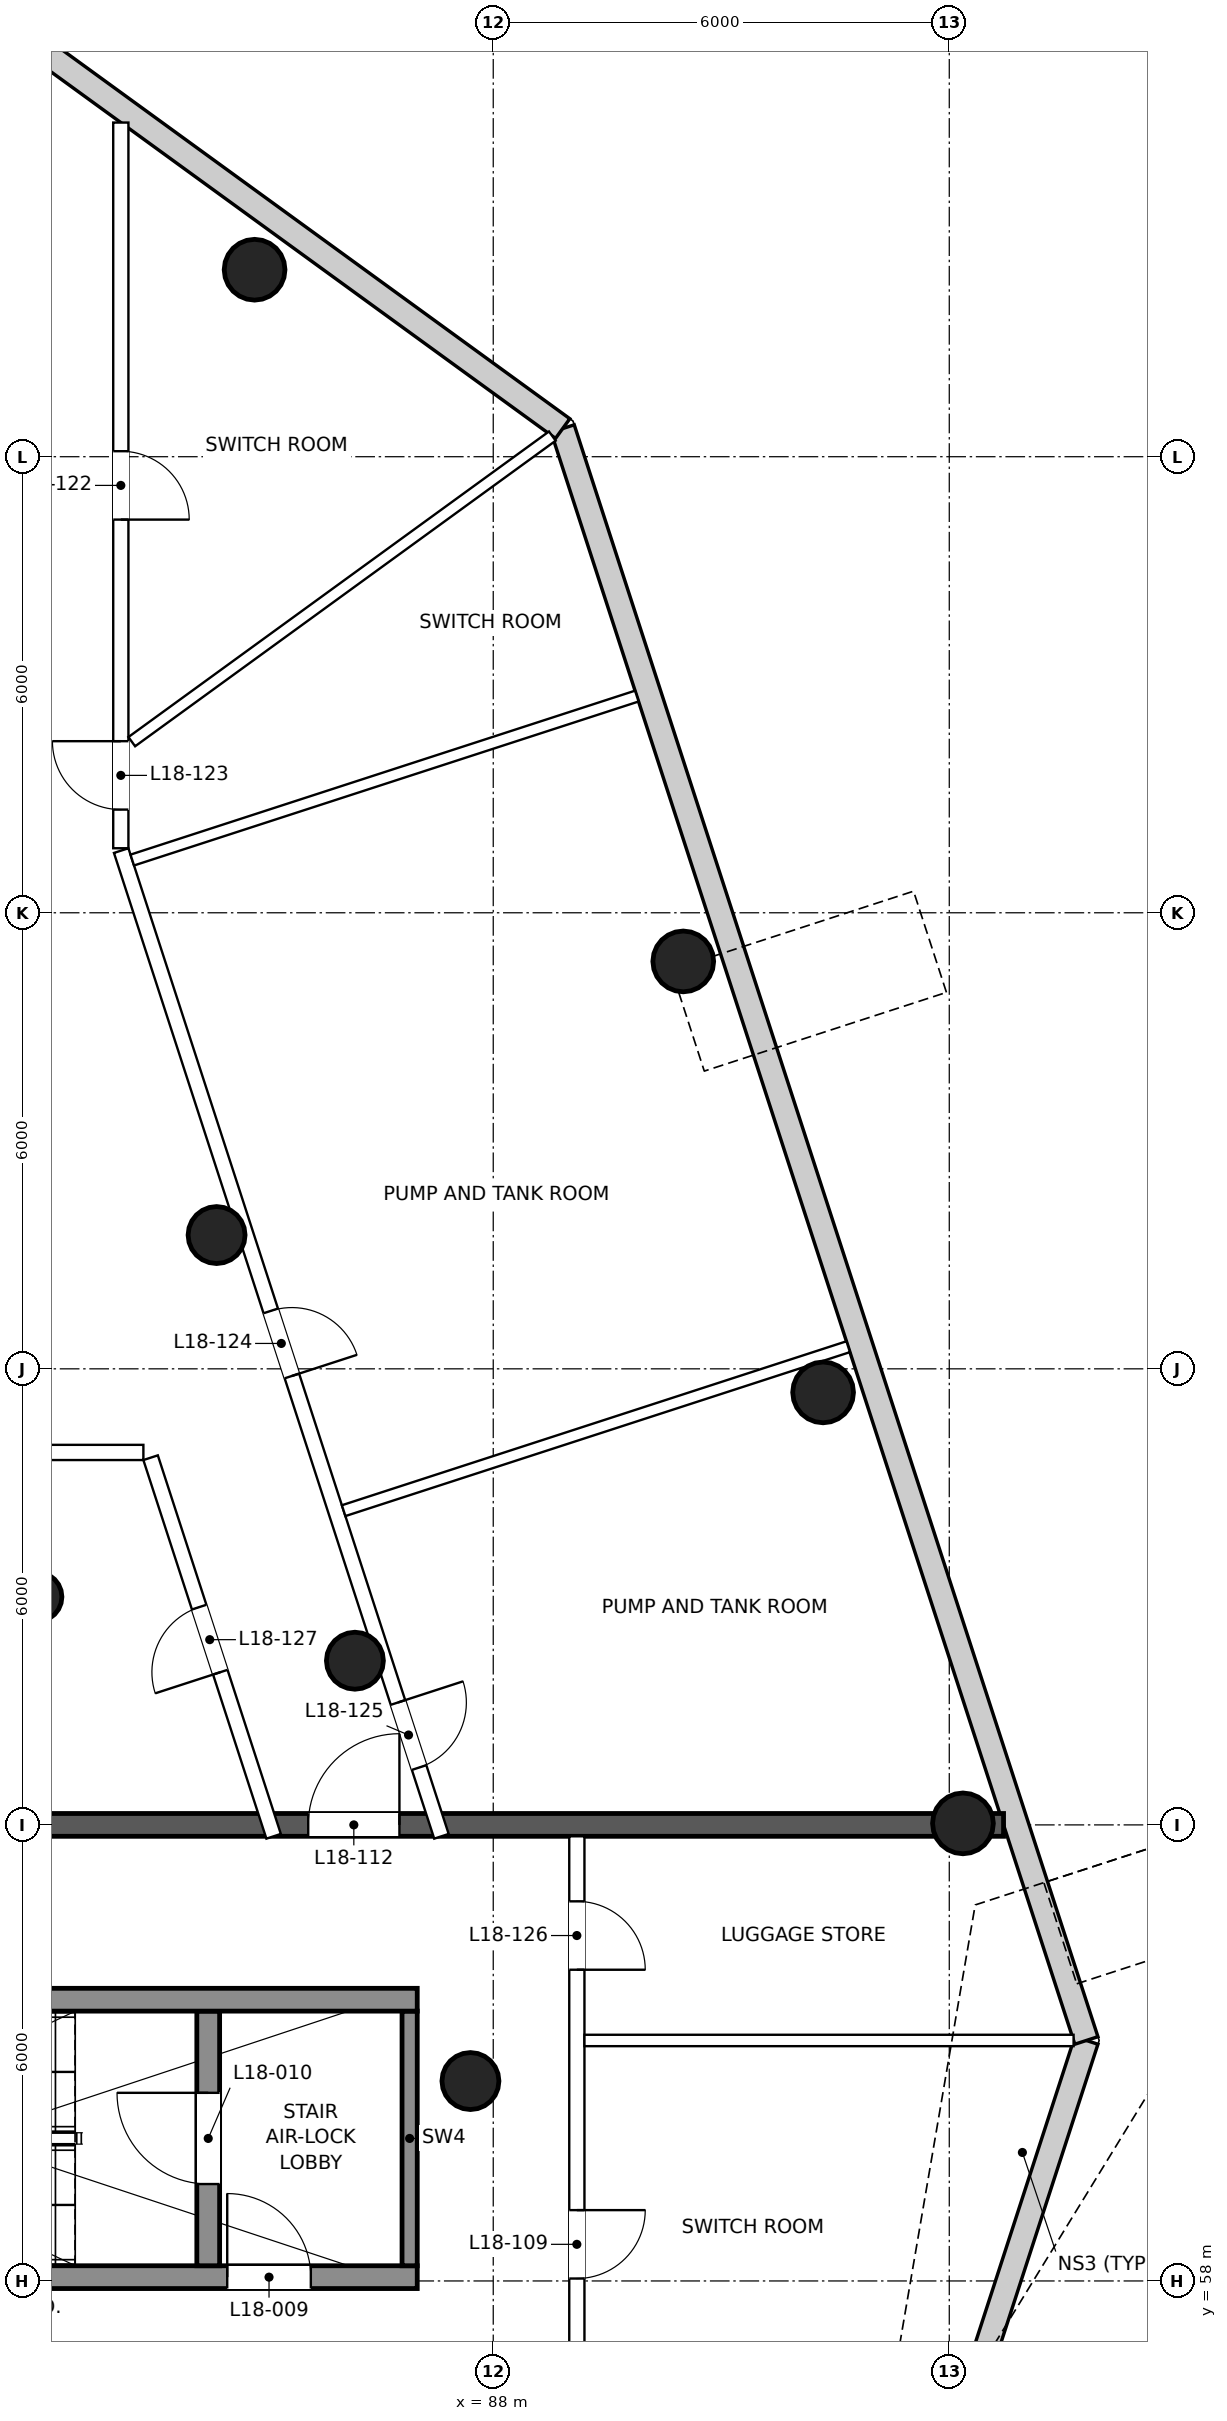
"""IFC4 building model, lengths in metres.
Left out: names, types, materials, properties, quantities, classifications, styles, units other than length and angle.
Written with IfcOpenShell. Run it as: python <this file> out.ifc"""

import sys

from ifc_helpers import new_model, si_unit, direction, frame, frame_2d, origin, origin_2d, place, context, subcontext, project, spatial, rectangle, circle, extrude, element, fill, save


model = new_model("IFC4")
c1 = context("Model", 3, precision=1e-05, world=origin(), true_north=direction((0.0, 1.0)))
c2 = subcontext(c1, "Body", "Model", "MODEL_VIEW")
j1 = project(units=[si_unit("LENGTHUNIT", "METRE"), si_unit("PLANEANGLEUNIT", "RADIAN")], contexts=[c1])
p1 = place(None, origin())
s1 = spatial("IfcSite", under=j1, at=p1, CompositionType="ELEMENT")
p2 = place(p1, origin())
s2 = spatial("IfcBuilding", under=s1, at=p2, CompositionType="ELEMENT")
p3 = place(p2, frame((0.0, 0.0, 85.8)))
s3 = spatial("IfcBuildingStorey", under=s2, at=p3, CompositionType="ELEMENT", Elevation=85.8)
for number, where, z_axis, x_axis in (
    (1, (94.18, 64.02, 0.0), (0.0, 0.0, 1.0), (1.0, 0.0, 0.0)),
    (2, (92.34, 69.69, 0.0), (0.0, 0.0, 1.0), (1.0, 0.0, 0.0)),
    (3, (90.5, 75.36, 0.0), (0.0, 0.0, 1.0), (1.0, 0.0, 0.0)),
    (4, (84.86, 84.46, 0.0), (0.0, 0.0, 1.0), (1.0, 0.0, 0.0)),
):
    element("IfcColumn", number, at=place(p3, frame(where, z_axis=z_axis, x_axis=x_axis)), inside=s3, PredefinedType="COLUMN", context=c2, shape_type="SweptSolid", body=[
        extrude(circle(Radius=0.4, at=origin_2d()), origin(), (0.0, 0.0, 1.0), 5.0),
    ])
for number, where, z_axis, x_axis in (
    (5, (87.7, 60.63, 0.0), (0.0, 0.0, 1.0), (1.0, 0.0, 0.0)),
    (6, (86.18, 66.16, 0.0), (0.0, 0.0, 1.0), (1.0, 0.0, 0.0)),
    (7, (84.36, 71.76, 0.0), (0.0, 0.0, 1.0), (1.0, 0.0, 0.0)),
):
    element("IfcColumn", number, at=place(p3, frame(where, z_axis=z_axis, x_axis=x_axis)), inside=s3, PredefinedType="COLUMN", context=c2, shape_type="SweptSolid", body=[
        extrude(circle(Radius=0.375, at=origin_2d()), origin(), (0.0, 0.0, 1.0), 5.0),
    ])
p4 = place(p3, frame((82.0, 67.0, 0.0), z_axis=(0.0, 0.0, 1.0), x_axis=(1.0, 0.0, 0.0)))
e8 = element("IfcColumn", 8, at=p4, inside=s3, PredefinedType="COLUMN", context=c2, shape_type="SweptSolid", body=[
    extrude(circle(Radius=0.325, at=origin_2d()), origin(), (0.0, 0.0, 1.0), 5.0),
])
p5 = place(p3, frame((92.967, 52.434, 0.0), z_axis=(0.0, 0.0, 1.0), x_axis=(0.309021723461, 0.951054979709, 0.0)))
e9 = element("IfcWall", 9, at=p5, inside=s3, PredefinedType="SOLIDWALL", context=c2, shape_type="SweptSolid", body=[
    extrude(rectangle(XDim=9.179, YDim=0.32, at=frame_2d((4.59, 0.0))), origin(), (0.0, 0.0, 1.0), 4.7),
])
p6 = place(p3, frame((95.804, 61.164, 0.0), z_axis=(0.0, 0.0, 1.0), x_axis=(-0.309015264684, 0.951057078304, 0.0)))
e10 = element("IfcWall", 10, at=p6, inside=s3, PredefinedType="SOLIDWALL", context=c2, shape_type="SweptSolid", body=[
    extrude(rectangle(XDim=22.298, YDim=0.32, at=frame_2d((11.149, 0.0))), origin(), (0.0, 0.0, 1.0), 4.7),
])
p7 = place(p3, frame((88.914, 82.37, 0.0), z_axis=(0.0, 0.0, 1.0), x_axis=(-0.809021884019, 0.587778522216, 0.0)))
e11 = element("IfcWall", 11, at=p7, inside=s3, PredefinedType="SOLIDWALL", context=c2, shape_type="SweptSolid", body=[
    extrude(rectangle(XDim=9.306, YDim=0.32, at=frame_2d((4.653, 0.0))), origin(), (0.0, 0.0, 1.0), 4.7),
])
p8 = place(p3, frame((75.1, 58.05, 0.0), z_axis=(0.0, 0.0, 1.0), x_axis=(1.0, 0.0, 0.0)))
e12 = element("IfcWall", 12, at=p8, inside=s3, PredefinedType="SHEAR", context=c2, shape_type="SweptSolid", body=[
    extrude(rectangle(XDim=11.9, YDim=0.3, at=frame_2d((5.95, 0.0))), origin(), (0.0, 0.0, 1.0), 5.0),
])
p9 = place(p8, frame((9.4, 0.0, 0.0)))
e13 = element("IfcOpeningElement", 13, at=p9, cuts=e12, PredefinedType="OPENING", context=c2, shape_type="SweptSolid", body=[
    extrude(rectangle(XDim=1.1, YDim=2.1, at=frame_2d((0.55, 1.05))), frame((0.0, 0.16, 0.0), z_axis=(0.0, -1.0, 0.0), x_axis=(1.0, 0.0, 0.0)), (0.0, 0.0, 1.0), 0.32),
])
p10 = place(p3, frame((84.25, 58.2, 0.0), z_axis=(0.0, 0.0, 1.0), x_axis=(0.0, 1.0, 0.0)))
e14 = element("IfcWall", 14, at=p10, inside=s3, PredefinedType="SHEAR", context=c2, shape_type="SweptSolid", body=[
    extrude(rectangle(XDim=3.35, YDim=0.3, at=frame_2d((1.675, 0.0))), origin(), (0.0, 0.0, 1.0), 5.0),
])
p11 = place(p10, frame((1.075, 0.0, 0.0)))
e15 = element("IfcOpeningElement", 15, at=p11, cuts=e14, PredefinedType="OPENING", context=c2, shape_type="SweptSolid", body=[
    extrude(rectangle(XDim=1.2, YDim=2.1, at=frame_2d((0.6, 1.05))), frame((0.0, 0.16, 0.0), z_axis=(0.0, -1.0, 0.0), x_axis=(1.0, 0.0, 0.0)), (0.0, 0.0, 1.0), 0.32),
])
p12 = place(p3, frame((86.9, 58.2, 0.0), z_axis=(0.0, 0.0, 1.0), x_axis=(0.0, 1.0, 0.0)))
e16 = element("IfcWall", 16, at=p12, inside=s3, PredefinedType="SHEAR", context=c2, shape_type="SweptSolid", body=[
    extrude(rectangle(XDim=3.35, YDim=0.2, at=frame_2d((1.675, 0.0))), origin(), (0.0, 0.0, 1.0), 5.0),
])
p13 = place(p3, frame((75.1, 61.7, 0.0), z_axis=(0.0, 0.0, 1.0), x_axis=(1.0, 0.0, 0.0)))
e17 = element("IfcWall", 17, at=p13, inside=s3, PredefinedType="SHEAR", context=c2, shape_type="SweptSolid", body=[
    extrude(rectangle(XDim=11.9, YDim=0.3, at=frame_2d((5.95, 0.0))), origin(), (0.0, 0.0, 1.0), 5.0),
])
p14 = place(p3, frame((45.286, 64.0, 0.0), z_axis=(0.0, 0.0, 1.0), x_axis=(1.0, 0.0, 0.0)))
e18 = element("IfcWall", 18, at=p14, inside=s3, PredefinedType="PARTITIONING", context=c2, shape_type="SweptSolid", body=[
    extrude(rectangle(XDim=49.428, YDim=0.3, at=frame_2d((24.714, 0.0))), origin(), (0.0, 0.0, 1.0), 3.7),
])
p15 = place(p14, frame((7.948, 0.0, 0.0)))
e19 = element("IfcOpeningElement", 19, at=p15, cuts=e18, PredefinedType="OPENING", context=c2, shape_type="SweptSolid", body=[
    extrude(rectangle(XDim=1.2, YDim=2.1, at=frame_2d((0.6, 1.05))), frame((0.0, 0.16, 0.0), z_axis=(0.0, -1.0, 0.0), x_axis=(1.0, 0.0, 0.0)), (0.0, 0.0, 1.0), 0.32),
])
p16 = place(p14, frame((24.114, 0.0, 0.0)))
e20 = element("IfcOpeningElement", 20, at=p16, cuts=e18, PredefinedType="OPENING", context=c2, shape_type="SweptSolid", body=[
    extrude(rectangle(XDim=1.2, YDim=2.1, at=frame_2d((0.6, 1.05))), frame((0.0, 0.16, 0.0), z_axis=(0.0, -1.0, 0.0), x_axis=(1.0, 0.0, 0.0)), (0.0, 0.0, 1.0), 0.32),
])
p17 = place(p14, frame((40.28, 0.0, 0.0)))
e21 = element("IfcOpeningElement", 21, at=p17, cuts=e18, PredefinedType="OPENING", context=c2, shape_type="SweptSolid", body=[
    extrude(rectangle(XDim=1.2, YDim=2.1, at=frame_2d((0.6, 1.05))), frame((0.0, 0.16, 0.0), z_axis=(0.0, -1.0, 0.0), x_axis=(1.0, 0.0, 0.0)), (0.0, 0.0, 1.0), 0.32),
])
p18 = place(p3, frame((83.1, 86.396, 0.0), z_axis=(0.0, 0.0, 1.0), x_axis=(0.0, -1.0, 0.0)))
e22 = element("IfcWall", 22, at=p18, inside=s3, PredefinedType="PARTITIONING", context=c2, shape_type="SweptSolid", body=[
    extrude(rectangle(XDim=9.547, YDim=0.2, at=frame_2d((4.773, 0.0))), origin(), (0.0, 0.0, 1.0), 4.2),
])
p19 = place(p18, frame((4.323, 0.0, 0.0)))
e23 = element("IfcOpeningElement", 23, at=p19, cuts=e22, PredefinedType="OPENING", context=c2, shape_type="SweptSolid", body=[
    extrude(rectangle(XDim=0.9, YDim=2.1, at=frame_2d((0.45, 1.05))), frame((0.0, 0.11, 0.0), z_axis=(0.0, -1.0, 0.0), x_axis=(1.0, 0.0, 0.0)), (0.0, 0.0, 1.0), 0.22),
])
p20 = place(p18, frame((8.139, 0.0, 0.0)))
e24 = element("IfcOpeningElement", 24, at=p20, cuts=e22, PredefinedType="OPENING", context=c2, shape_type="SweptSolid", body=[
    extrude(rectangle(XDim=0.9, YDim=2.1, at=frame_2d((0.45, 1.05))), frame((0.0, 0.11, 0.0), z_axis=(0.0, -1.0, 0.0), x_axis=(1.0, 0.0, 0.0)), (0.0, 0.0, 1.0), 0.22),
])
p21 = place(p3, frame((83.105, 76.818, 0.0), z_axis=(0.0, 0.0, 1.0), x_axis=(0.309020889227, -0.951055250772, 0.0)))
e25 = element("IfcWall", 25, at=p21, inside=s3, PredefinedType="PARTITIONING", context=c2, shape_type="SweptSolid", body=[
    extrude(rectangle(XDim=13.635, YDim=0.2, at=frame_2d((6.818, 0.0))), origin(), (0.0, 0.0, 1.0), 4.7),
])
p22 = place(p21, frame((6.368, 0.0, 0.0)))
e26 = element("IfcOpeningElement", 26, at=p22, cuts=e25, PredefinedType="OPENING", context=c2, shape_type="SweptSolid", body=[
    extrude(rectangle(XDim=0.9, YDim=2.1, at=frame_2d((0.45, 1.05))), frame((0.0, 0.11, 0.0), z_axis=(0.0, -1.0, 0.0), x_axis=(1.0, 0.0, 0.0)), (0.0, 0.0, 1.0), 0.22),
])
p23 = place(p21, frame((11.784, 0.0, 0.0)))
e27 = element("IfcOpeningElement", 27, at=p23, cuts=e25, PredefinedType="OPENING", context=c2, shape_type="SweptSolid", body=[
    extrude(rectangle(XDim=0.9, YDim=2.1, at=frame_2d((0.45, 1.05))), frame((0.0, 0.11, 0.0), z_axis=(0.0, -1.0, 0.0), x_axis=(1.0, 0.0, 0.0)), (0.0, 0.0, 1.0), 0.22),
])
p24 = place(p3, frame((89.1, 63.85, 0.0), z_axis=(0.0, 0.0, 1.0), x_axis=(0.0, -1.0, 0.0)))
e28 = element("IfcWall", 28, at=p24, inside=s3, PredefinedType="PARTITIONING", context=c2, shape_type="SweptSolid", body=[
    extrude(rectangle(XDim=7.95, YDim=0.2, at=frame_2d((3.975, 0.0))), origin(), (0.0, 0.0, 1.0), 4.7),
])
p25 = place(p24, frame((4.918, 0.0, 0.0)))
e29 = element("IfcOpeningElement", 29, at=p25, cuts=e28, PredefinedType="OPENING", context=c2, shape_type="SweptSolid", body=[
    extrude(rectangle(XDim=0.9, YDim=2.1, at=frame_2d((0.45, 1.05))), frame((0.0, 0.11, 0.0), z_axis=(0.0, -1.0, 0.0), x_axis=(1.0, 0.0, 0.0)), (0.0, 0.0, 1.0), 0.22),
])
p26 = place(p24, frame((0.856, 0.0, 0.0)))
e30 = element("IfcOpeningElement", 30, at=p26, cuts=e28, PredefinedType="OPENING", context=c2, shape_type="SweptSolid", body=[
    extrude(rectangle(XDim=0.9, YDim=2.1, at=frame_2d((0.45, 1.05))), frame((0.0, 0.11, 0.0), z_axis=(0.0, -1.0, 0.0), x_axis=(1.0, 0.0, 0.0)), (0.0, 0.0, 1.0), 0.22),
])
p27 = place(p3, frame((85.11, 63.85, 0.0), z_axis=(0.0, 0.0, 1.0), x_axis=(-0.309030204086, 0.951052224099, 0.0)))
e31 = element("IfcWall", 31, at=p27, inside=s3, PredefinedType="PARTITIONING", context=c2, shape_type="SweptSolid", body=[
    extrude(rectangle(XDim=5.237, YDim=0.2, at=frame_2d((2.619, 0.0))), origin(), (0.0, 0.0, 1.0), 4.7),
])
p28 = place(p27, frame((2.27, 0.0, 0.0)))
e32 = element("IfcOpeningElement", 32, at=p28, cuts=e31, PredefinedType="OPENING", context=c2, shape_type="SweptSolid", body=[
    extrude(rectangle(XDim=0.9, YDim=2.1, at=frame_2d((0.45, 1.05))), frame((0.0, 0.11, 0.0), z_axis=(0.0, -1.0, 0.0), x_axis=(1.0, 0.0, 0.0)), (0.0, 0.0, 1.0), 0.22),
])
p29 = place(p3, frame((83.397, 68.9, 0.0), z_axis=(0.0, 0.0, 1.0), x_axis=(-1.0, 0.0, 0.0)))
e33 = element("IfcWall", 33, at=p29, inside=s3, PredefinedType="PARTITIONING", context=c2, shape_type="SweptSolid", body=[
    extrude(rectangle(XDim=12.247, YDim=0.2, at=frame_2d((6.124, 0.0))), origin(), (0.0, 0.0, 1.0), 4.7),
])
p30 = place(p29, frame((5.674, 0.0, 0.0)))
e34 = element("IfcOpeningElement", 34, at=p30, cuts=e33, PredefinedType="OPENING", context=c2, shape_type="SweptSolid", body=[
    extrude(rectangle(XDim=0.9, YDim=2.1, at=frame_2d((0.45, 1.05))), frame((0.0, 0.11, 0.0), z_axis=(0.0, -1.0, 0.0), x_axis=(1.0, 0.0, 0.0)), (0.0, 0.0, 1.0), 0.22),
])
p31 = place(p3, frame((95.635, 61.164, 0.0), z_axis=(0.0, 0.0, 1.0), x_axis=(-1.0, 0.0, 0.0)))
e35 = element("IfcWall", 35, at=p31, inside=s3, PredefinedType="PARTITIONING", context=c2, shape_type="SweptSolid", body=[
    extrude(rectangle(XDim=6.436, YDim=0.15, at=frame_2d((3.218, 0.0))), origin(), (0.0, 0.0, 1.0), 4.2),
])
p32 = place(p3, frame((88.777, 82.271, 0.0), z_axis=(0.0, 0.0, 1.0), x_axis=(-0.809006128226, -0.587800207973, 0.0)))
e36 = element("IfcWall", 36, at=p32, inside=s3, PredefinedType="PARTITIONING", context=c2, shape_type="SweptSolid", body=[
    extrude(rectangle(XDim=6.84, YDim=0.15, at=frame_2d((3.42, 0.0))), origin(), (0.0, 0.0, 1.0), 4.0),
])
p33 = place(p3, frame((92.67, 70.291, 0.0), z_axis=(0.0, 0.0, 1.0), x_axis=(-0.951055400562, -0.309020428229, 0.0)))
e37 = element("IfcWall", 37, at=p33, inside=s3, PredefinedType="PARTITIONING", context=c2, shape_type="SweptSolid", body=[
    extrude(rectangle(XDim=6.98, YDim=0.15, at=frame_2d((3.49, 0.0))), origin(), (0.0, 0.0, 1.0), 4.2),
])
p34 = place(p3, frame((89.889, 78.851, 0.0), z_axis=(0.0, 0.0, 1.0), x_axis=(-0.951055400562, -0.309020428229, 0.0)))
e38 = element("IfcWall", 38, at=p34, inside=s3, PredefinedType="PARTITIONING", context=c2, shape_type="SweptSolid", body=[
    extrude(rectangle(XDim=6.98, YDim=0.15, at=frame_2d((3.49, 0.0))), origin(), (0.0, 0.0, 1.0), 4.0),
])
p35 = place(p9, origin())
e39 = element("IfcDoor", 39, at=p35, inside=s3, OperationType="SINGLE_SWING_LEFT", PredefinedType="DOOR", context=c2, shape_type="SweptSolid", body=[
    extrude(rectangle(XDim=1.1, YDim=2.1, at=frame_2d((0.55, 1.05))), frame((0.0, 0.025, 0.0), z_axis=(0.0, -1.0, 0.0), x_axis=(1.0, 0.0, 0.0)), (0.0, 0.0, 1.0), 0.05),
])
fill(e13, e39)
p36 = place(p11, origin())
e40 = element("IfcDoor", 40, at=p36, inside=s3, OperationType="SINGLE_SWING_RIGHT", PredefinedType="DOOR", context=c2, shape_type="SweptSolid", body=[
    extrude(rectangle(XDim=1.2, YDim=2.1, at=frame_2d((0.6, 1.05))), frame((0.0, 0.025, 0.0), z_axis=(0.0, -1.0, 0.0), x_axis=(1.0, 0.0, 0.0)), (0.0, 0.0, 1.0), 0.05),
])
fill(e15, e40)
p37 = place(p25, origin())
e41 = element("IfcDoor", 41, at=p37, inside=s3, OperationType="SINGLE_SWING_LEFT", PredefinedType="DOOR", context=c2, shape_type="SweptSolid", body=[
    extrude(rectangle(XDim=0.9, YDim=2.1, at=frame_2d((0.45, 1.05))), frame((0.0, 0.025, 0.0), z_axis=(0.0, -1.0, 0.0), x_axis=(1.0, 0.0, 0.0)), (0.0, 0.0, 1.0), 0.05),
])
fill(e29, e41)
p38 = place(p17, origin())
e42 = element("IfcDoor", 42, at=p38, inside=s3, OperationType="SINGLE_SWING_RIGHT", PredefinedType="DOOR", context=c2, shape_type="SweptSolid", body=[
    extrude(rectangle(XDim=1.2, YDim=2.1, at=frame_2d((0.6, 1.05))), frame((0.0, 0.025, 0.0), z_axis=(0.0, -1.0, 0.0), x_axis=(1.0, 0.0, 0.0)), (0.0, 0.0, 1.0), 0.05),
])
fill(e21, e42)
p39 = place(p19, origin())
e43 = element("IfcDoor", 43, at=p39, inside=s3, OperationType="SINGLE_SWING_RIGHT", PredefinedType="DOOR", context=c2, shape_type="SweptSolid", body=[
    extrude(rectangle(XDim=0.9, YDim=2.1, at=frame_2d((0.45, 1.05))), frame((0.0, 0.025, 0.0), z_axis=(0.0, -1.0, 0.0), x_axis=(1.0, 0.0, 0.0)), (0.0, 0.0, 1.0), 0.05),
])
fill(e23, e43)
p40 = place(p20, frame((0.9, 0.0, 0.0), z_axis=(0.0, 0.0, 1.0), x_axis=(-1.0, 0.0, 0.0)))
e44 = element("IfcDoor", 44, at=p40, inside=s3, OperationType="SINGLE_SWING_RIGHT", PredefinedType="DOOR", context=c2, shape_type="SweptSolid", body=[
    extrude(rectangle(XDim=0.9, YDim=2.1, at=frame_2d((0.45, 1.05))), frame((0.0, 0.025, 0.0), z_axis=(0.0, -1.0, 0.0), x_axis=(1.0, 0.0, 0.0)), (0.0, 0.0, 1.0), 0.05),
])
fill(e24, e44)
p41 = place(p22, origin())
e45 = element("IfcDoor", 45, at=p41, inside=s3, OperationType="SINGLE_SWING_RIGHT", PredefinedType="DOOR", context=c2, shape_type="SweptSolid", body=[
    extrude(rectangle(XDim=0.9, YDim=2.1, at=frame_2d((0.45, 1.05))), frame((0.0, 0.025, 0.0), z_axis=(0.0, -1.0, 0.0), x_axis=(1.0, 0.0, 0.0)), (0.0, 0.0, 1.0), 0.05),
])
fill(e26, e45)
p42 = place(p23, origin())
e46 = element("IfcDoor", 46, at=p42, inside=s3, OperationType="SINGLE_SWING_LEFT", PredefinedType="DOOR", context=c2, shape_type="SweptSolid", body=[
    extrude(rectangle(XDim=0.9, YDim=2.1, at=frame_2d((0.45, 1.05))), frame((0.0, 0.025, 0.0), z_axis=(0.0, -1.0, 0.0), x_axis=(1.0, 0.0, 0.0)), (0.0, 0.0, 1.0), 0.05),
])
fill(e27, e46)
p43 = place(p26, origin())
e47 = element("IfcDoor", 47, at=p43, inside=s3, OperationType="SINGLE_SWING_RIGHT", PredefinedType="DOOR", context=c2, shape_type="SweptSolid", body=[
    extrude(rectangle(XDim=0.9, YDim=2.1, at=frame_2d((0.45, 1.05))), frame((0.0, 0.025, 0.0), z_axis=(0.0, -1.0, 0.0), x_axis=(1.0, 0.0, 0.0)), (0.0, 0.0, 1.0), 0.05),
])
fill(e30, e47)
p44 = place(p28, origin())
e48 = element("IfcDoor", 48, at=p44, inside=s3, OperationType="SINGLE_SWING_LEFT", PredefinedType="DOOR", context=c2, shape_type="SweptSolid", body=[
    extrude(rectangle(XDim=0.9, YDim=2.1, at=frame_2d((0.45, 1.05))), frame((0.0, 0.025, 0.0), z_axis=(0.0, -1.0, 0.0), x_axis=(1.0, 0.0, 0.0)), (0.0, 0.0, 1.0), 0.05),
])
fill(e32, e48)
save(model, sys.argv[1])
